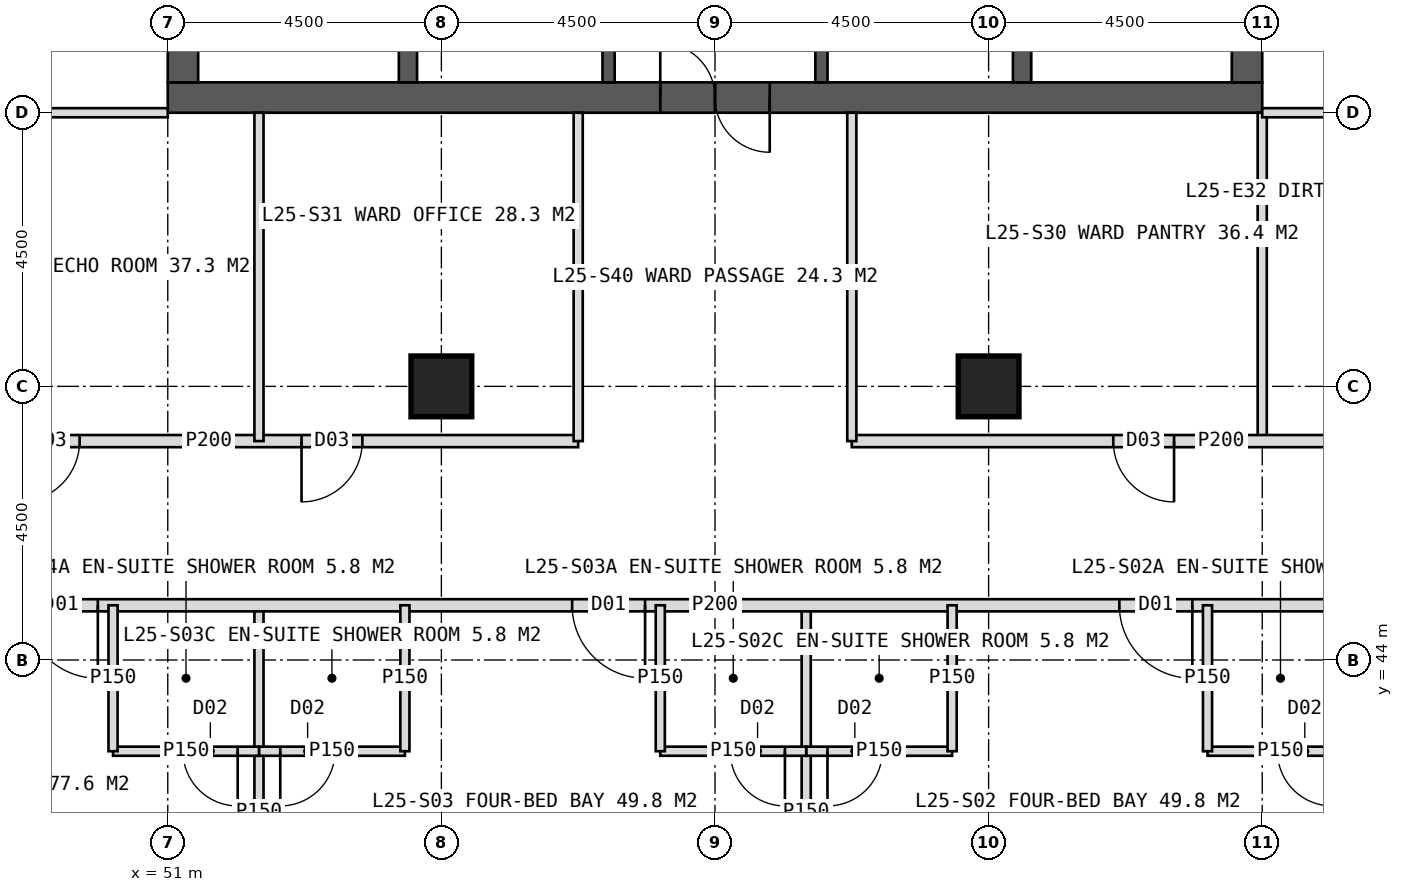
"""IFC4 building model, lengths in metres.
Left out: names, types, materials, properties, quantities, classifications, styles, units other than length and angle.
Written with IfcOpenShell. Run it as: python <this file> out.ifc"""

import sys

from ifc_helpers import new_model, si_unit, direction, frame, frame_2d, origin, origin_2d, place, context, subcontext, project, spatial, rectangle, hollow_rectangle, extrude, element, fill, save


model = new_model("IFC4")
c1 = context("Model", 3, precision=1e-05, world=origin(), true_north=direction((0.0, 1.0)))
c2 = subcontext(c1, "Body", "Model", "MODEL_VIEW")
j1 = project(units=[si_unit("LENGTHUNIT", "METRE"), si_unit("PLANEANGLEUNIT", "RADIAN")], contexts=[c1])
p1 = place(None, origin())
s1 = spatial("IfcSite", under=j1, at=p1, CompositionType="ELEMENT")
p2 = place(p1, origin())
s2 = spatial("IfcBuilding", under=s1, at=p2, CompositionType="ELEMENT")
p3 = place(p2, frame((0.0, 0.0, 108.0)))
s3 = spatial("IfcBuildingStorey", under=s2, at=p3, CompositionType="ELEMENT", Elevation=108.0)
p4 = place(p3, frame((51.0, 53.25, 0.0), z_axis=(0.0, 0.0, 1.0), x_axis=(1.0, 0.0, 0.0)))
e1 = element("IfcWall", 1, at=p4, inside=s3, PredefinedType="SHEAR", context=c2, shape_type="SweptSolid", body=[
    extrude(rectangle(XDim=18.0, YDim=0.5, at=frame_2d((9.0, 0.0))), origin(), (0.0, 0.0, 1.0), 4.0),
])
p5 = place(p4, frame((8.1, 0.0, 0.0)))
e2 = element("IfcOpeningElement", 2, at=p5, cuts=e1, PredefinedType="OPENING", context=c2, shape_type="SweptSolid", body=[
    extrude(rectangle(XDim=1.8, YDim=2.2, at=frame_2d((0.9, 1.1))), frame((0.0, 0.26, 0.0), z_axis=(0.0, -1.0, 0.0), x_axis=(1.0, 0.0, 0.0)), (0.0, 0.0, 1.0), 0.52),
])
p6 = place(p3, frame((51.25, 53.5, 0.0), z_axis=(0.0, 0.0, 1.0), x_axis=(0.0, 1.0, 0.0)))
e3 = element("IfcWall", 3, at=p6, inside=s3, PredefinedType="SHEAR", context=c2, shape_type="SweptSolid", body=[
    extrude(rectangle(XDim=17.0, YDim=0.5, at=frame_2d((8.5, 0.0))), origin(), (0.0, 0.0, 1.0), 4.0),
])
p7 = place(p6, frame((6.0, 0.0, 0.0)))
e4 = element("IfcOpeningElement", 4, at=p7, cuts=e3, PredefinedType="OPENING", context=c2, shape_type="SweptSolid", body=[
    extrude(rectangle(XDim=1.5, YDim=2.2, at=frame_2d((0.75, 1.1))), frame((0.0, 0.26, 0.0), z_axis=(0.0, -1.0, 0.0), x_axis=(1.0, 0.0, 0.0)), (0.0, 0.0, 1.0), 0.52),
])
p8 = place(p3, frame((68.75, 53.5, 0.0), z_axis=(0.0, 0.0, 1.0), x_axis=(0.0, 1.0, 0.0)))
e5 = element("IfcWall", 5, at=p8, inside=s3, PredefinedType="SHEAR", context=c2, shape_type="SweptSolid", body=[
    extrude(rectangle(XDim=17.0, YDim=0.5, at=frame_2d((8.5, 0.0))), origin(), (0.0, 0.0, 1.0), 4.0),
])
p9 = place(p8, frame((9.5, 0.0, 0.0)))
e6 = element("IfcOpeningElement", 6, at=p9, cuts=e5, PredefinedType="OPENING", context=c2, shape_type="SweptSolid", body=[
    extrude(rectangle(XDim=1.5, YDim=2.2, at=frame_2d((0.75, 1.1))), frame((0.0, 0.26, 0.0), z_axis=(0.0, -1.0, 0.0), x_axis=(1.0, 0.0, 0.0)), (0.0, 0.0, 1.0), 0.52),
])
for number, where, z_axis, x_axis in (
    (7, (54.95, 53.5, 0.0), (0.0, 0.0, 1.0), (0.0, 1.0, 0.0)),
    (8, (65.05, 53.5, 0.0), (0.0, 0.0, 1.0), (0.0, 1.0, 0.0)),
):
    element("IfcWall", number, at=place(p3, frame(where, z_axis=z_axis, x_axis=x_axis)), inside=s3, PredefinedType="SHEAR", context=c2, shape_type="SweptSolid", body=[
        extrude(rectangle(XDim=17.0, YDim=0.3, at=frame_2d((8.5, 0.0))), origin(), (0.0, 0.0, 1.0), 4.0),
    ])
p10 = place(p3, frame((58.25, 53.5, 0.0), z_axis=(0.0, 0.0, 1.0), x_axis=(0.0, 1.0, 0.0)))
e9 = element("IfcWall", 9, at=p10, inside=s3, PredefinedType="SHEAR", context=c2, shape_type="SweptSolid", body=[
    extrude(rectangle(XDim=17.0, YDim=0.2, at=frame_2d((8.5, 0.0))), origin(), (0.0, 0.0, 1.0), 4.0),
])
p11 = place(p10, frame((1.375, 0.0, 0.0)))
e10 = element("IfcOpeningElement", 10, at=p11, cuts=e9, PredefinedType="OPENING", context=c2, shape_type="SweptSolid", body=[
    extrude(rectangle(XDim=1.4, YDim=2.2, at=frame_2d((0.7, 1.1))), frame((0.0, 0.11, 0.0), z_axis=(0.0, -1.0, 0.0), x_axis=(1.0, 0.0, 0.0)), (0.0, 0.0, 1.0), 0.22),
])
p12 = place(p10, frame((5.675, 0.0, 0.0)))
e11 = element("IfcOpeningElement", 11, at=p12, cuts=e9, PredefinedType="OPENING", context=c2, shape_type="SweptSolid", body=[
    extrude(rectangle(XDim=1.4, YDim=2.2, at=frame_2d((0.7, 1.1))), frame((0.0, 0.11, 0.0), z_axis=(0.0, -1.0, 0.0), x_axis=(1.0, 0.0, 0.0)), (0.0, 0.0, 1.0), 0.22),
])
p13 = place(p3, frame((61.75, 53.5, 0.0), z_axis=(0.0, 0.0, 1.0), x_axis=(0.0, 1.0, 0.0)))
e12 = element("IfcWall", 12, at=p13, inside=s3, PredefinedType="SHEAR", context=c2, shape_type="SweptSolid", body=[
    extrude(rectangle(XDim=17.0, YDim=0.2, at=frame_2d((8.5, 0.0))), origin(), (0.0, 0.0, 1.0), 4.0),
])
p14 = place(p13, frame((1.375, 0.0, 0.0)))
e13 = element("IfcOpeningElement", 13, at=p14, cuts=e12, PredefinedType="OPENING", context=c2, shape_type="SweptSolid", body=[
    extrude(rectangle(XDim=1.4, YDim=2.2, at=frame_2d((0.7, 1.1))), frame((0.0, 0.11, 0.0), z_axis=(0.0, -1.0, 0.0), x_axis=(1.0, 0.0, 0.0)), (0.0, 0.0, 1.0), 0.22),
])
p15 = place(p13, frame((5.675, 0.0, 0.0)))
e14 = element("IfcOpeningElement", 14, at=p15, cuts=e12, PredefinedType="OPENING", context=c2, shape_type="SweptSolid", body=[
    extrude(rectangle(XDim=1.4, YDim=2.2, at=frame_2d((0.7, 1.1))), frame((0.0, 0.11, 0.0), z_axis=(0.0, -1.0, 0.0), x_axis=(1.0, 0.0, 0.0)), (0.0, 0.0, 1.0), 0.22),
])
for number, where, z_axis, x_axis in (
    (15, (55.5, 48.5, 0.0), (0.0, 0.0, 1.0), (1.0, 0.0, 0.0)),
    (16, (64.5, 48.5, 0.0), (0.0, 0.0, 1.0), (1.0, 0.0, 0.0)),
):
    element("IfcColumn", number, at=place(p3, frame(where, z_axis=z_axis, x_axis=x_axis)), inside=s3, PredefinedType="COLUMN", context=c2, shape_type="SweptSolid", body=[
        extrude(hollow_rectangle(XDim=1.0, YDim=1.0, WallThickness=0.1, at=origin_2d()), origin(), (0.0, 0.0, 1.0), 4.0),
    ])
p16 = place(p3, frame((51.0, 53.0, 0.0), z_axis=(0.0, 0.0, 1.0), x_axis=(-1.0, 0.0, 0.0)))
e17 = element("IfcWall", 17, at=p16, inside=s3, PredefinedType="PARTITIONING", context=c2, shape_type="SweptSolid", body=[
    extrude(rectangle(XDim=5.4, YDim=0.15, at=frame_2d((2.7, 0.0))), origin(), (0.0, 0.0, 1.0), 3.75),
])
for number, where, z_axis, x_axis in (
    (18, (61.5, 44.9, 0.0), (0.0, 0.0, 1.0), (0.0, -1.0, 0.0)),
    (19, (52.5, 44.9, 0.0), (0.0, 0.0, 1.0), (0.0, -1.0, 0.0)),
):
    element("IfcWall", number, at=place(p3, frame(where, z_axis=z_axis, x_axis=x_axis)), inside=s3, PredefinedType="PARTITIONING", context=c2, shape_type="SweptSolid", body=[
        extrude(rectangle(XDim=6.81, YDim=0.15, at=frame_2d((3.405, 0.0))), origin(), (0.0, 0.0, 1.0), 3.75),
    ])
p17 = place(p3, frame((77.1, 44.9, 0.0), z_axis=(0.0, 0.0, 1.0), x_axis=(-1.0, 0.0, 0.0)))
e20 = element("IfcWall", 20, at=p17, inside=s3, PredefinedType="PARTITIONING", context=c2, shape_type="SweptSolid", body=[
    extrude(rectangle(XDim=34.2, YDim=0.2, at=frame_2d((17.1, 0.0))), origin(), (0.0, 0.0, 1.0), 3.75),
])
p18 = place(p17, frame((3.25, 0.0, 0.0)))
e21 = element("IfcOpeningElement", 21, at=p18, cuts=e20, PredefinedType="OPENING", context=c2, shape_type="SweptSolid", body=[
    extrude(rectangle(XDim=1.2, YDim=2.2, at=frame_2d((0.6, 1.1))), frame((0.0, 0.11, 0.0), z_axis=(0.0, -1.0, 0.0), x_axis=(1.0, 0.0, 0.0)), (0.0, 0.0, 1.0), 0.22),
])
p19 = place(p17, frame((9.25, 0.0, 0.0)))
e22 = element("IfcOpeningElement", 22, at=p19, cuts=e20, PredefinedType="OPENING", context=c2, shape_type="SweptSolid", body=[
    extrude(rectangle(XDim=1.2, YDim=2.2, at=frame_2d((0.6, 1.1))), frame((0.0, 0.11, 0.0), z_axis=(0.0, -1.0, 0.0), x_axis=(1.0, 0.0, 0.0)), (0.0, 0.0, 1.0), 0.22),
])
p20 = place(p17, frame((18.25, 0.0, 0.0)))
e23 = element("IfcOpeningElement", 23, at=p20, cuts=e20, PredefinedType="OPENING", context=c2, shape_type="SweptSolid", body=[
    extrude(rectangle(XDim=1.2, YDim=2.2, at=frame_2d((0.6, 1.1))), frame((0.0, 0.11, 0.0), z_axis=(0.0, -1.0, 0.0), x_axis=(1.0, 0.0, 0.0)), (0.0, 0.0, 1.0), 0.22),
])
p21 = place(p17, frame((27.25, 0.0, 0.0)))
e24 = element("IfcOpeningElement", 24, at=p21, cuts=e20, PredefinedType="OPENING", context=c2, shape_type="SweptSolid", body=[
    extrude(rectangle(XDim=1.2, YDim=2.2, at=frame_2d((0.6, 1.1))), frame((0.0, 0.11, 0.0), z_axis=(0.0, -1.0, 0.0), x_axis=(1.0, 0.0, 0.0)), (0.0, 0.0, 1.0), 0.22),
])
p22 = place(p3, frame((70.5, 42.5, 0.0), z_axis=(0.0, 0.0, 1.0), x_axis=(-1.0, 0.0, 0.0)))
e25 = element("IfcWall", 25, at=p22, inside=s3, PredefinedType="PARTITIONING", context=c2, shape_type="SweptSolid", body=[
    extrude(rectangle(XDim=2.4, YDim=0.15, at=frame_2d((1.2, 0.0))), origin(), (0.0, 0.0, 1.0), 3.75),
])
p23 = place(p22, frame((0.35, 0.0, 0.0)))
e26 = element("IfcOpeningElement", 26, at=p23, cuts=e25, PredefinedType="OPENING", context=c2, shape_type="SweptSolid", body=[
    extrude(rectangle(XDim=0.9, YDim=2.1, at=frame_2d((0.45, 1.05))), frame((0.0, 0.085, 0.0), z_axis=(0.0, -1.0, 0.0), x_axis=(1.0, 0.0, 0.0)), (0.0, 0.0, 1.0), 0.17),
])
p24 = place(p3, frame((68.1, 44.9, 0.0), z_axis=(0.0, 0.0, 1.0), x_axis=(0.0, -1.0, 0.0)))
e27 = element("IfcWall", 27, at=p24, inside=s3, PredefinedType="PARTITIONING", context=c2, shape_type="SweptSolid", body=[
    extrude(rectangle(XDim=2.4, YDim=0.15, at=frame_2d((1.2, 0.0))), origin(), (0.0, 0.0, 1.0), 3.75),
])
p25 = place(p3, frame((63.9, 42.5, 0.0), z_axis=(0.0, 0.0, 1.0), x_axis=(-1.0, 0.0, 0.0)))
e28 = element("IfcWall", 28, at=p25, inside=s3, PredefinedType="PARTITIONING", context=c2, shape_type="SweptSolid", body=[
    extrude(rectangle(XDim=2.4, YDim=0.15, at=frame_2d((1.2, 0.0))), origin(), (0.0, 0.0, 1.0), 3.75),
])
p26 = place(p25, frame((1.15, 0.0, 0.0)))
e29 = element("IfcOpeningElement", 29, at=p26, cuts=e28, PredefinedType="OPENING", context=c2, shape_type="SweptSolid", body=[
    extrude(rectangle(XDim=0.9, YDim=2.1, at=frame_2d((0.45, 1.05))), frame((0.0, 0.085, 0.0), z_axis=(0.0, -1.0, 0.0), x_axis=(1.0, 0.0, 0.0)), (0.0, 0.0, 1.0), 0.17),
])
p27 = place(p3, frame((63.9, 44.9, 0.0), z_axis=(0.0, 0.0, 1.0), x_axis=(0.0, -1.0, 0.0)))
e30 = element("IfcWall", 30, at=p27, inside=s3, PredefinedType="PARTITIONING", context=c2, shape_type="SweptSolid", body=[
    extrude(rectangle(XDim=2.4, YDim=0.15, at=frame_2d((1.2, 0.0))), origin(), (0.0, 0.0, 1.0), 3.75),
])
p28 = place(p3, frame((61.5, 42.5, 0.0), z_axis=(0.0, 0.0, 1.0), x_axis=(-1.0, 0.0, 0.0)))
e31 = element("IfcWall", 31, at=p28, inside=s3, PredefinedType="PARTITIONING", context=c2, shape_type="SweptSolid", body=[
    extrude(rectangle(XDim=2.4, YDim=0.15, at=frame_2d((1.2, 0.0))), origin(), (0.0, 0.0, 1.0), 3.75),
])
p29 = place(p28, frame((0.35, 0.0, 0.0)))
e32 = element("IfcOpeningElement", 32, at=p29, cuts=e31, PredefinedType="OPENING", context=c2, shape_type="SweptSolid", body=[
    extrude(rectangle(XDim=0.9, YDim=2.1, at=frame_2d((0.45, 1.05))), frame((0.0, 0.085, 0.0), z_axis=(0.0, -1.0, 0.0), x_axis=(1.0, 0.0, 0.0)), (0.0, 0.0, 1.0), 0.17),
])
p30 = place(p3, frame((59.1, 44.9, 0.0), z_axis=(0.0, 0.0, 1.0), x_axis=(0.0, -1.0, 0.0)))
e33 = element("IfcWall", 33, at=p30, inside=s3, PredefinedType="PARTITIONING", context=c2, shape_type="SweptSolid", body=[
    extrude(rectangle(XDim=2.4, YDim=0.15, at=frame_2d((1.2, 0.0))), origin(), (0.0, 0.0, 1.0), 3.75),
])
p31 = place(p3, frame((54.9, 42.5, 0.0), z_axis=(0.0, 0.0, 1.0), x_axis=(-1.0, 0.0, 0.0)))
e34 = element("IfcWall", 34, at=p31, inside=s3, PredefinedType="PARTITIONING", context=c2, shape_type="SweptSolid", body=[
    extrude(rectangle(XDim=2.4, YDim=0.15, at=frame_2d((1.2, 0.0))), origin(), (0.0, 0.0, 1.0), 3.75),
])
p32 = place(p31, frame((1.15, 0.0, 0.0)))
e35 = element("IfcOpeningElement", 35, at=p32, cuts=e34, PredefinedType="OPENING", context=c2, shape_type="SweptSolid", body=[
    extrude(rectangle(XDim=0.9, YDim=2.1, at=frame_2d((0.45, 1.05))), frame((0.0, 0.085, 0.0), z_axis=(0.0, -1.0, 0.0), x_axis=(1.0, 0.0, 0.0)), (0.0, 0.0, 1.0), 0.17),
])
p33 = place(p3, frame((54.9, 44.9, 0.0), z_axis=(0.0, 0.0, 1.0), x_axis=(0.0, -1.0, 0.0)))
e36 = element("IfcWall", 36, at=p33, inside=s3, PredefinedType="PARTITIONING", context=c2, shape_type="SweptSolid", body=[
    extrude(rectangle(XDim=2.4, YDim=0.15, at=frame_2d((1.2, 0.0))), origin(), (0.0, 0.0, 1.0), 3.75),
])
p34 = place(p3, frame((52.5, 42.5, 0.0), z_axis=(0.0, 0.0, 1.0), x_axis=(-1.0, 0.0, 0.0)))
e37 = element("IfcWall", 37, at=p34, inside=s3, PredefinedType="PARTITIONING", context=c2, shape_type="SweptSolid", body=[
    extrude(rectangle(XDim=2.4, YDim=0.15, at=frame_2d((1.2, 0.0))), origin(), (0.0, 0.0, 1.0), 3.75),
])
p35 = place(p34, frame((0.35, 0.0, 0.0)))
e38 = element("IfcOpeningElement", 38, at=p35, cuts=e37, PredefinedType="OPENING", context=c2, shape_type="SweptSolid", body=[
    extrude(rectangle(XDim=0.9, YDim=2.1, at=frame_2d((0.45, 1.05))), frame((0.0, 0.085, 0.0), z_axis=(0.0, -1.0, 0.0), x_axis=(1.0, 0.0, 0.0)), (0.0, 0.0, 1.0), 0.17),
])
p36 = place(p3, frame((50.1, 44.9, 0.0), z_axis=(0.0, 0.0, 1.0), x_axis=(0.0, -1.0, 0.0)))
e39 = element("IfcWall", 39, at=p36, inside=s3, PredefinedType="PARTITIONING", context=c2, shape_type="SweptSolid", body=[
    extrude(rectangle(XDim=2.4, YDim=0.15, at=frame_2d((1.2, 0.0))), origin(), (0.0, 0.0, 1.0), 3.75),
])
p37 = place(p3, frame((69.0, 53.0, 0.0), z_axis=(0.0, 0.0, 1.0), x_axis=(0.0, -1.0, 0.0)))
e40 = element("IfcWall", 40, at=p37, inside=s3, PredefinedType="PARTITIONING", context=c2, shape_type="SweptSolid", body=[
    extrude(rectangle(XDim=5.4, YDim=0.15, at=frame_2d((2.7, 0.0))), origin(), (0.0, 0.0, 1.0), 3.75),
])
p38 = place(p3, frame((74.4, 47.6, 0.0), z_axis=(0.0, 0.0, 1.0), x_axis=(-1.0, 0.0, 0.0)))
e41 = element("IfcWall", 41, at=p38, inside=s3, PredefinedType="PARTITIONING", context=c2, shape_type="SweptSolid", body=[
    extrude(rectangle(XDim=12.15, YDim=0.2, at=frame_2d((6.075, 0.0))), origin(), (0.0, 0.0, 1.0), 3.75),
])
p39 = place(p38, frame((6.85, 0.0, 0.0)))
e42 = element("IfcOpeningElement", 42, at=p39, cuts=e41, PredefinedType="OPENING", context=c2, shape_type="SweptSolid", body=[
    extrude(rectangle(XDim=1.0, YDim=2.1, at=frame_2d((0.5, 1.05))), frame((0.0, 0.11, 0.0), z_axis=(0.0, -1.0, 0.0), x_axis=(1.0, 0.0, 0.0)), (0.0, 0.0, 1.0), 0.22),
])
p40 = place(p3, frame((57.75, 47.6, 0.0), z_axis=(0.0, 0.0, 1.0), x_axis=(-1.0, 0.0, 0.0)))
e43 = element("IfcWall", 43, at=p40, inside=s3, PredefinedType="PARTITIONING", context=c2, shape_type="SweptSolid", body=[
    extrude(rectangle(XDim=12.15, YDim=0.2, at=frame_2d((6.075, 0.0))), origin(), (0.0, 0.0, 1.0), 3.75),
])
p41 = place(p40, frame((3.55, 0.0, 0.0)))
e44 = element("IfcOpeningElement", 44, at=p41, cuts=e43, PredefinedType="OPENING", context=c2, shape_type="SweptSolid", body=[
    extrude(rectangle(XDim=1.0, YDim=2.1, at=frame_2d((0.5, 1.05))), frame((0.0, 0.11, 0.0), z_axis=(0.0, -1.0, 0.0), x_axis=(1.0, 0.0, 0.0)), (0.0, 0.0, 1.0), 0.22),
])
p42 = place(p40, frame((8.2, 0.0, 0.0)))
e45 = element("IfcOpeningElement", 45, at=p42, cuts=e43, PredefinedType="OPENING", context=c2, shape_type="SweptSolid", body=[
    extrude(rectangle(XDim=1.0, YDim=2.1, at=frame_2d((0.5, 1.05))), frame((0.0, 0.11, 0.0), z_axis=(0.0, -1.0, 0.0), x_axis=(1.0, 0.0, 0.0)), (0.0, 0.0, 1.0), 0.22),
])
for number, where, z_axis, x_axis in (
    (46, (62.25, 53.0, 0.0), (0.0, 0.0, 1.0), (0.0, -1.0, 0.0)),
    (47, (57.75, 53.0, 0.0), (0.0, 0.0, 1.0), (0.0, -1.0, 0.0)),
    (48, (52.5, 53.0, 0.0), (0.0, 0.0, 1.0), (0.0, -1.0, 0.0)),
    (49, (69.0, 53.0, 0.0), (0.0, 0.0, 1.0), (1.0, 0.0, 0.0)),
):
    element("IfcWall", number, at=place(p3, frame(where, z_axis=z_axis, x_axis=x_axis)), inside=s3, PredefinedType="PARTITIONING", context=c2, shape_type="SweptSolid", body=[
        extrude(rectangle(XDim=5.4, YDim=0.15, at=frame_2d((2.7, 0.0))), origin(), (0.0, 0.0, 1.0), 3.75),
    ])
p43 = place(p19, origin())
e50 = element("IfcDoor", 50, at=p43, inside=s3, OperationType="SINGLE_SWING_LEFT", PredefinedType="DOOR", context=c2, shape_type="SweptSolid", body=[
    extrude(rectangle(XDim=1.2, YDim=2.2, at=frame_2d((0.6, 1.1))), frame((0.0, 0.025, 0.0), z_axis=(0.0, -1.0, 0.0), x_axis=(1.0, 0.0, 0.0)), (0.0, 0.0, 1.0), 0.05),
])
fill(e22, e50)
p44 = place(p23, origin())
e51 = element("IfcDoor", 51, at=p44, inside=s3, OperationType="SINGLE_SWING_LEFT", PredefinedType="DOOR", context=c2, shape_type="SweptSolid", body=[
    extrude(rectangle(XDim=0.9, YDim=2.1, at=frame_2d((0.45, 1.05))), frame((0.0, 0.025, 0.0), z_axis=(0.0, -1.0, 0.0), x_axis=(1.0, 0.0, 0.0)), (0.0, 0.0, 1.0), 0.05),
])
fill(e26, e51)
p45 = place(p26, origin())
e52 = element("IfcDoor", 52, at=p45, inside=s3, OperationType="SINGLE_SWING_RIGHT", PredefinedType="DOOR", context=c2, shape_type="SweptSolid", body=[
    extrude(rectangle(XDim=0.9, YDim=2.1, at=frame_2d((0.45, 1.05))), frame((0.0, 0.025, 0.0), z_axis=(0.0, -1.0, 0.0), x_axis=(1.0, 0.0, 0.0)), (0.0, 0.0, 1.0), 0.05),
])
fill(e29, e52)
p46 = place(p20, origin())
e53 = element("IfcDoor", 53, at=p46, inside=s3, OperationType="SINGLE_SWING_LEFT", PredefinedType="DOOR", context=c2, shape_type="SweptSolid", body=[
    extrude(rectangle(XDim=1.2, YDim=2.2, at=frame_2d((0.6, 1.1))), frame((0.0, 0.025, 0.0), z_axis=(0.0, -1.0, 0.0), x_axis=(1.0, 0.0, 0.0)), (0.0, 0.0, 1.0), 0.05),
])
fill(e23, e53)
p47 = place(p29, origin())
e54 = element("IfcDoor", 54, at=p47, inside=s3, OperationType="SINGLE_SWING_LEFT", PredefinedType="DOOR", context=c2, shape_type="SweptSolid", body=[
    extrude(rectangle(XDim=0.9, YDim=2.1, at=frame_2d((0.45, 1.05))), frame((0.0, 0.025, 0.0), z_axis=(0.0, -1.0, 0.0), x_axis=(1.0, 0.0, 0.0)), (0.0, 0.0, 1.0), 0.05),
])
fill(e32, e54)
p48 = place(p32, origin())
e55 = element("IfcDoor", 55, at=p48, inside=s3, OperationType="SINGLE_SWING_RIGHT", PredefinedType="DOOR", context=c2, shape_type="SweptSolid", body=[
    extrude(rectangle(XDim=0.9, YDim=2.1, at=frame_2d((0.45, 1.05))), frame((0.0, 0.025, 0.0), z_axis=(0.0, -1.0, 0.0), x_axis=(1.0, 0.0, 0.0)), (0.0, 0.0, 1.0), 0.05),
])
fill(e35, e55)
p49 = place(p21, origin())
e56 = element("IfcDoor", 56, at=p49, inside=s3, OperationType="SINGLE_SWING_LEFT", PredefinedType="DOOR", context=c2, shape_type="SweptSolid", body=[
    extrude(rectangle(XDim=1.2, YDim=2.2, at=frame_2d((0.6, 1.1))), frame((0.0, 0.025, 0.0), z_axis=(0.0, -1.0, 0.0), x_axis=(1.0, 0.0, 0.0)), (0.0, 0.0, 1.0), 0.05),
])
fill(e24, e56)
p50 = place(p35, origin())
e57 = element("IfcDoor", 57, at=p50, inside=s3, OperationType="SINGLE_SWING_LEFT", PredefinedType="DOOR", context=c2, shape_type="SweptSolid", body=[
    extrude(rectangle(XDim=0.9, YDim=2.1, at=frame_2d((0.45, 1.05))), frame((0.0, 0.025, 0.0), z_axis=(0.0, -1.0, 0.0), x_axis=(1.0, 0.0, 0.0)), (0.0, 0.0, 1.0), 0.05),
])
fill(e38, e57)
p51 = place(p39, origin())
e58 = element("IfcDoor", 58, at=p51, inside=s3, OperationType="SINGLE_SWING_LEFT", PredefinedType="DOOR", context=c2, shape_type="SweptSolid", body=[
    extrude(rectangle(XDim=1.0, YDim=2.1, at=frame_2d((0.5, 1.05))), frame((0.0, 0.025, 0.0), z_axis=(0.0, -1.0, 0.0), x_axis=(1.0, 0.0, 0.0)), (0.0, 0.0, 1.0), 0.05),
])
fill(e42, e58)
p52 = place(p41, origin())
e59 = element("IfcDoor", 59, at=p52, inside=s3, OperationType="SINGLE_SWING_RIGHT", PredefinedType="DOOR", context=c2, shape_type="SweptSolid", body=[
    extrude(rectangle(XDim=1.0, YDim=2.1, at=frame_2d((0.5, 1.05))), frame((0.0, 0.025, 0.0), z_axis=(0.0, -1.0, 0.0), x_axis=(1.0, 0.0, 0.0)), (0.0, 0.0, 1.0), 0.05),
])
fill(e44, e59)
p53 = place(p42, origin())
e60 = element("IfcDoor", 60, at=p53, inside=s3, OperationType="SINGLE_SWING_RIGHT", PredefinedType="DOOR", context=c2, shape_type="SweptSolid", body=[
    extrude(rectangle(XDim=1.0, YDim=2.1, at=frame_2d((0.5, 1.05))), frame((0.0, 0.025, 0.0), z_axis=(0.0, -1.0, 0.0), x_axis=(1.0, 0.0, 0.0)), (0.0, 0.0, 1.0), 0.05),
])
fill(e45, e60)
p54 = place(p5, origin())
e61 = element("IfcDoor", 61, at=p54, inside=s3, OperationType="DOUBLE_DOOR_SINGLE_SWING", PredefinedType="DOOR", context=c2, shape_type="SweptSolid", body=[
    extrude(rectangle(XDim=1.8, YDim=2.2, at=frame_2d((0.9, 1.1))), frame((0.0, 0.025, 0.0), z_axis=(0.0, -1.0, 0.0), x_axis=(1.0, 0.0, 0.0)), (0.0, 0.0, 1.0), 0.05),
])
fill(e2, e61)
save(model, sys.argv[1])
